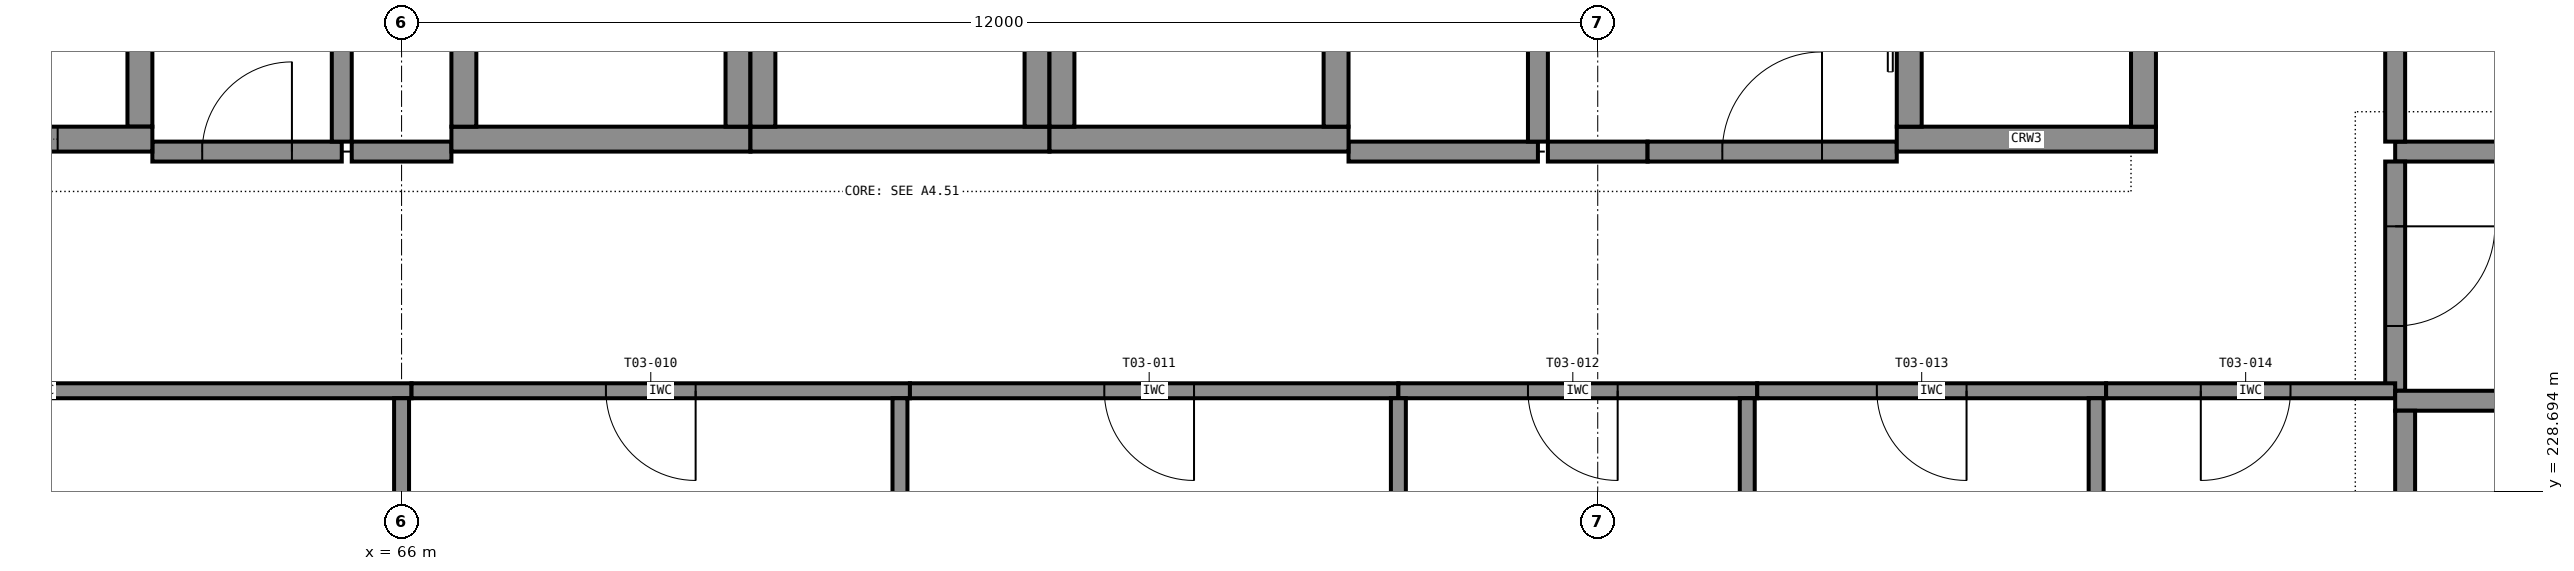
"""IFC4 building model, lengths in metres.
Left out: names, types, materials, properties, quantities, classifications, styles, units other than length and angle.
Written with IfcOpenShell. Run it as: python <this file> out.ifc"""

import sys

from ifc_helpers import new_model, si_unit, direction, frame, frame_2d, origin, place, context, subcontext, project, spatial, rectangle, extrude, element, fill, save


model = new_model("IFC4")
c1 = context("Model", 3, precision=1e-05, world=origin(), true_north=direction((0.0, 1.0)))
c2 = subcontext(c1, "Body", "Model", "MODEL_VIEW")
j1 = project(units=[si_unit("LENGTHUNIT", "METRE"), si_unit("PLANEANGLEUNIT", "RADIAN")], contexts=[c1])
p1 = place(None, origin())
s1 = spatial("IfcSite", under=j1, at=p1, CompositionType="ELEMENT")
p2 = place(p1, origin())
s2 = spatial("IfcBuilding", under=s1, at=p2, CompositionType="ELEMENT")
p3 = place(p2, frame((0.0, 0.0, 17.0)))
s3 = spatial("IfcBuildingStorey", under=s2, at=p3, CompositionType="ELEMENT", Elevation=17.0)
p4 = place(p3, frame((60.5, 232.225, 0.0), z_axis=(0.0, 0.0, 1.0), x_axis=(1.0, 0.0, 0.0)))
e1 = element("IfcWall", 1, at=p4, inside=s3, PredefinedType="SHEAR", context=c2, shape_type="SweptSolid", body=[
    extrude(rectangle(XDim=3.0, YDim=0.25, at=frame_2d((1.5, 0.0))), origin(), (0.0, 0.0, 1.0), 4.0),
])
p5 = place(p4, frame((0.95, 0.0, 0.0)))
e2 = element("IfcOpeningElement", 2, at=p5, cuts=e1, PredefinedType="OPENING", context=c2, shape_type="SweptSolid", body=[
    extrude(rectangle(XDim=1.1, YDim=2.1, at=frame_2d((0.55, 1.05))), frame((0.0, 0.135, 0.0), z_axis=(0.0, -1.0, 0.0), x_axis=(1.0, 0.0, 0.0)), (0.0, 0.0, 1.0), 0.27),
])
p6 = place(p3, frame((63.375, 232.35, 0.0), z_axis=(0.0, 0.0, 1.0), x_axis=(0.0, 1.0, 0.0)))
e3 = element("IfcWall", 3, at=p6, inside=s3, PredefinedType="SHEAR", context=c2, shape_type="SweptSolid", body=[
    extrude(rectangle(XDim=3.3, YDim=0.25, at=frame_2d((1.65, 0.0))), origin(), (0.0, 0.0, 1.0), 4.0),
])
p7 = place(p3, frame((66.5, 232.225, 0.0), z_axis=(0.0, 0.0, 1.0), x_axis=(1.0, 0.0, 0.0)))
e4 = element("IfcWall", 4, at=p7, inside=s3, PredefinedType="SHEAR", context=c2, shape_type="SweptSolid", body=[
    extrude(rectangle(XDim=3.0, YDim=0.25, at=frame_2d((1.5, 0.0))), origin(), (0.0, 0.0, 1.0), 4.0),
])
for number, where, z_axis, x_axis in (
    (5, (66.625, 232.35, 0.0), (0.0, 0.0, 1.0), (0.0, 1.0, 0.0)),
    (6, (69.375, 232.35, 0.0), (0.0, 0.0, 1.0), (0.0, 1.0, 0.0)),
):
    element("IfcWall", number, at=place(p3, frame(where, z_axis=z_axis, x_axis=x_axis)), inside=s3, PredefinedType="SHEAR", context=c2, shape_type="SweptSolid", body=[
        extrude(rectangle(XDim=3.3, YDim=0.25, at=frame_2d((1.65, 0.0))), origin(), (0.0, 0.0, 1.0), 4.0),
    ])
p8 = place(p3, frame((69.5, 232.225, 0.0), z_axis=(0.0, 0.0, 1.0), x_axis=(1.0, 0.0, 0.0)))
e7 = element("IfcWall", 7, at=p8, inside=s3, PredefinedType="SHEAR", context=c2, shape_type="SweptSolid", body=[
    extrude(rectangle(XDim=3.0, YDim=0.25, at=frame_2d((1.5, 0.0))), origin(), (0.0, 0.0, 1.0), 4.0),
])
for number, where, z_axis, x_axis in (
    (8, (69.625, 232.35, 0.0), (0.0, 0.0, 1.0), (0.0, 1.0, 0.0)),
    (9, (72.375, 232.35, 0.0), (0.0, 0.0, 1.0), (0.0, 1.0, 0.0)),
):
    element("IfcWall", number, at=place(p3, frame(where, z_axis=z_axis, x_axis=x_axis)), inside=s3, PredefinedType="SHEAR", context=c2, shape_type="SweptSolid", body=[
        extrude(rectangle(XDim=3.3, YDim=0.25, at=frame_2d((1.65, 0.0))), origin(), (0.0, 0.0, 1.0), 4.0),
    ])
p9 = place(p3, frame((72.5, 232.225, 0.0), z_axis=(0.0, 0.0, 1.0), x_axis=(1.0, 0.0, 0.0)))
e10 = element("IfcWall", 10, at=p9, inside=s3, PredefinedType="SHEAR", context=c2, shape_type="SweptSolid", body=[
    extrude(rectangle(XDim=3.0, YDim=0.25, at=frame_2d((1.5, 0.0))), origin(), (0.0, 0.0, 1.0), 4.0),
])
for number, where, z_axis, x_axis in (
    (11, (72.625, 232.35, 0.0), (0.0, 0.0, 1.0), (0.0, 1.0, 0.0)),
    (12, (75.375, 232.35, 0.0), (0.0, 0.0, 1.0), (0.0, 1.0, 0.0)),
):
    element("IfcWall", number, at=place(p3, frame(where, z_axis=z_axis, x_axis=x_axis)), inside=s3, PredefinedType="SHEAR", context=c2, shape_type="SweptSolid", body=[
        extrude(rectangle(XDim=3.3, YDim=0.25, at=frame_2d((1.65, 0.0))), origin(), (0.0, 0.0, 1.0), 4.0),
    ])
p10 = place(p3, frame((81.0, 232.225, 0.0), z_axis=(0.0, 0.0, 1.0), x_axis=(1.0, 0.0, 0.0)))
e13 = element("IfcWall", 13, at=p10, inside=s3, PredefinedType="SHEAR", context=c2, shape_type="SweptSolid", body=[
    extrude(rectangle(XDim=2.6, YDim=0.25, at=frame_2d((1.3, 0.0))), origin(), (0.0, 0.0, 1.0), 4.0),
])
p11 = place(p3, frame((81.125, 232.35, 0.0), z_axis=(0.0, 0.0, 1.0), x_axis=(0.0, 1.0, 0.0)))
e14 = element("IfcWall", 14, at=p11, inside=s3, PredefinedType="SHEAR", context=c2, shape_type="SweptSolid", body=[
    extrude(rectangle(XDim=3.3, YDim=0.25, at=frame_2d((1.65, 0.0))), origin(), (0.0, 0.0, 1.0), 4.0),
])
p12 = place(p11, frame((1.1, 0.0, 0.0)))
e15 = element("IfcOpeningElement", 15, at=p12, cuts=e14, PredefinedType="OPENING", context=c2, shape_type="SweptSolid", body=[
    extrude(rectangle(XDim=1.1, YDim=2.1, at=frame_2d((0.55, 1.05))), frame((0.0, 0.135, 0.0), z_axis=(0.0, -1.0, 0.0), x_axis=(1.0, 0.0, 0.0)), (0.0, 0.0, 1.0), 0.27),
])
p13 = place(p3, frame((83.475, 232.35, 0.0), z_axis=(0.0, 0.0, 1.0), x_axis=(0.0, 1.0, 0.0)))
e16 = element("IfcWall", 16, at=p13, inside=s3, PredefinedType="SHEAR", context=c2, shape_type="SweptSolid", body=[
    extrude(rectangle(XDim=3.3, YDim=0.25, at=frame_2d((1.65, 0.0))), origin(), (0.0, 0.0, 1.0), 4.0),
])
p14 = place(p3, frame((89.5, 229.6, 0.0), z_axis=(0.0, 0.0, 1.0), x_axis=(-1.0, 0.0, 0.0)))
e17 = element("IfcWall", 17, at=p14, inside=s3, PredefinedType="SHEAR", context=c2, shape_type="SweptSolid", body=[
    extrude(rectangle(XDim=3.5, YDim=0.2, at=frame_2d((1.75, 0.0))), origin(), (0.0, 0.0, 1.0), 4.0),
])
p15 = place(p14, frame((1.15, 0.0, 0.0)))
e18 = element("IfcOpeningElement", 18, at=p15, cuts=e17, PredefinedType="OPENING", context=c2, shape_type="SweptSolid", body=[
    extrude(rectangle(XDim=1.2, YDim=2.1, at=frame_2d((0.6, 1.05))), frame((0.0, 0.11, 0.0), z_axis=(0.0, -1.0, 0.0), x_axis=(1.0, 0.0, 0.0)), (0.0, 0.0, 1.0), 0.22),
])
p16 = place(p3, frame((86.1, 222.0, 0.0), z_axis=(0.0, 0.0, 1.0), x_axis=(0.0, 1.0, 0.0)))
e19 = element("IfcWall", 19, at=p16, inside=s3, PredefinedType="SHEAR", context=c2, shape_type="SweptSolid", body=[
    extrude(rectangle(XDim=7.5, YDim=0.2, at=frame_2d((3.75, 0.0))), origin(), (0.0, 0.0, 1.0), 4.0),
])
p17 = place(p3, frame((63.5, 232.1, 0.0), z_axis=(0.0, 0.0, 1.0), x_axis=(1.0, 0.0, 0.0)))
e20 = element("IfcWall", 20, at=p17, inside=s3, PredefinedType="PARTITIONING", context=c2, shape_type="SweptSolid", body=[
    extrude(rectangle(XDim=1.9, YDim=0.2, at=frame_2d((0.95, 0.0))), origin(), (0.0, 0.0, 1.0), 3.8),
])
p18 = place(p17, frame((0.5, 0.0, 0.0)))
e21 = element("IfcOpeningElement", 21, at=p18, cuts=e20, PredefinedType="OPENING", context=c2, shape_type="SweptSolid", body=[
    extrude(rectangle(XDim=0.9, YDim=2.1, at=frame_2d((0.45, 1.05))), frame((0.0, 0.11, 0.0), z_axis=(0.0, -1.0, 0.0), x_axis=(1.0, 0.0, 0.0)), (0.0, 0.0, 1.0), 0.22),
])
p19 = place(p3, frame((65.5, 232.1, 0.0), z_axis=(0.0, 0.0, 1.0), x_axis=(1.0, 0.0, 0.0)))
e22 = element("IfcWall", 22, at=p19, inside=s3, PredefinedType="PARTITIONING", context=c2, shape_type="SweptSolid", body=[
    extrude(rectangle(XDim=1.0, YDim=0.2, at=frame_2d((0.5, 0.0))), origin(), (0.0, 0.0, 1.0), 3.8),
])
p20 = place(p3, frame((75.5, 232.1, 0.0), z_axis=(0.0, 0.0, 1.0), x_axis=(1.0, 0.0, 0.0)))
e23 = element("IfcWall", 23, at=p20, inside=s3, PredefinedType="PARTITIONING", context=c2, shape_type="SweptSolid", body=[
    extrude(rectangle(XDim=1.9, YDim=0.2, at=frame_2d((0.95, 0.0))), origin(), (0.0, 0.0, 1.0), 3.8),
])
p21 = place(p3, frame((77.5, 232.1, 0.0), z_axis=(0.0, 0.0, 1.0), x_axis=(1.0, 0.0, 0.0)))
e24 = element("IfcWall", 24, at=p21, inside=s3, PredefinedType="PARTITIONING", context=c2, shape_type="SweptSolid", body=[
    extrude(rectangle(XDim=1.0, YDim=0.2, at=frame_2d((0.5, 0.0))), origin(), (0.0, 0.0, 1.0), 3.8),
])
p22 = place(p3, frame((78.5, 232.1, 0.0), z_axis=(0.0, 0.0, 1.0), x_axis=(1.0, 0.0, 0.0)))
e25 = element("IfcWall", 25, at=p22, inside=s3, PredefinedType="PARTITIONING", context=c2, shape_type="SweptSolid", body=[
    extrude(rectangle(XDim=2.5, YDim=0.2, at=frame_2d((1.25, 0.0))), origin(), (0.0, 0.0, 1.0), 3.8),
])
p23 = place(p22, frame((0.75, 0.0, 0.0)))
e26 = element("IfcOpeningElement", 26, at=p23, cuts=e25, PredefinedType="OPENING", context=c2, shape_type="SweptSolid", body=[
    extrude(rectangle(XDim=1.0, YDim=2.1, at=frame_2d((0.5, 1.05))), frame((0.0, 0.11, 0.0), z_axis=(0.0, -1.0, 0.0), x_axis=(1.0, 0.0, 0.0)), (0.0, 0.0, 1.0), 0.22),
])
p24 = place(p3, frame((86.0, 232.1, 0.0), z_axis=(0.0, 0.0, 1.0), x_axis=(1.0, 0.0, 0.0)))
e27 = element("IfcWall", 27, at=p24, inside=s3, PredefinedType="PARTITIONING", context=c2, shape_type="SweptSolid", body=[
    extrude(rectangle(XDim=3.65, YDim=0.2, at=frame_2d((1.825, 0.0))), origin(), (0.0, 0.0, 1.0), 3.8),
])
for number, where, z_axis, x_axis in (
    (28, (65.4, 232.2, 0.0), (0.0, 0.0, 1.0), (0.0, 1.0, 0.0)),
    (29, (77.4, 232.2, 0.0), (0.0, 0.0, 1.0), (0.0, 1.0, 0.0)),
):
    element("IfcWall", number, at=place(p3, frame(where, z_axis=z_axis, x_axis=x_axis)), inside=s3, PredefinedType="PARTITIONING", context=c2, shape_type="SweptSolid", body=[
        extrude(rectangle(XDim=3.6, YDim=0.2, at=frame_2d((1.8, 0.0))), origin(), (0.0, 0.0, 1.0), 3.8),
    ])
p25 = place(p3, frame((86.0, 235.8, 0.0), z_axis=(0.0, 0.0, 1.0), x_axis=(0.0, -1.0, 0.0)))
e30 = element("IfcWall", 30, at=p25, inside=s3, PredefinedType="PARTITIONING", context=c2, shape_type="SweptSolid", body=[
    extrude(rectangle(XDim=3.6, YDim=0.2, at=frame_2d((1.8, 0.0))), origin(), (0.0, 0.0, 1.0), 3.8),
])
p26 = place(p25, frame((1.35, 0.0, 0.0)))
e31 = element("IfcOpeningElement", 31, at=p26, cuts=e30, PredefinedType="OPENING", context=c2, shape_type="SweptSolid", body=[
    extrude(rectangle(XDim=0.9, YDim=2.1, at=frame_2d((0.45, 1.05))), frame((0.0, 0.11, 0.0), z_axis=(0.0, -1.0, 0.0), x_axis=(1.0, 0.0, 0.0)), (0.0, 0.0, 1.0), 0.22),
])
p27 = place(p3, frame((86.0, 232.0, 0.0), z_axis=(0.0, 0.0, 1.0), x_axis=(0.0, -1.0, 0.0)))
e32 = element("IfcWall", 32, at=p27, inside=s3, PredefinedType="PARTITIONING", context=c2, shape_type="SweptSolid", body=[
    extrude(rectangle(XDim=2.3, YDim=0.2, at=frame_2d((1.15, 0.0))), origin(), (0.0, 0.0, 1.0), 3.8),
])
p28 = place(p27, frame((0.65, 0.0, 0.0)))
e33 = element("IfcOpeningElement", 33, at=p28, cuts=e32, PredefinedType="OPENING", context=c2, shape_type="SweptSolid", body=[
    extrude(rectangle(XDim=1.0, YDim=2.1, at=frame_2d((0.5, 1.05))), frame((0.0, 0.11, 0.0), z_axis=(0.0, -1.0, 0.0), x_axis=(1.0, 0.0, 0.0)), (0.0, 0.0, 1.0), 0.22),
])
p29 = place(p3, frame((66.1, 229.7, 0.0), z_axis=(0.0, 0.0, 1.0), x_axis=(-1.0, 0.0, 0.0)))
e34 = element("IfcWall", 34, at=p29, inside=s3, PredefinedType="PARTITIONING", context=c2, shape_type="SweptSolid", body=[
    extrude(rectangle(XDim=23.7, YDim=0.15, at=frame_2d((11.85, 0.0))), origin(), (0.0, 0.0, 1.0), 3.8),
])
p30 = place(p29, frame((15.6, 0.0, 0.0)))
e35 = element("IfcOpeningElement", 35, at=p30, cuts=e34, PredefinedType="OPENING", context=c2, shape_type="SweptSolid", body=[
    extrude(rectangle(XDim=1.0, YDim=2.1, at=frame_2d((0.5, 1.05))), frame((0.0, 0.085, 0.0), z_axis=(0.0, -1.0, 0.0), x_axis=(1.0, 0.0, 0.0)), (0.0, 0.0, 1.0), 0.17),
])
p31 = place(p29, frame((6.6, 0.0, 0.0)))
e36 = element("IfcOpeningElement", 36, at=p31, cuts=e34, PredefinedType="OPENING", context=c2, shape_type="SweptSolid", body=[
    extrude(rectangle(XDim=1.0, YDim=2.1, at=frame_2d((0.5, 1.05))), frame((0.0, 0.085, 0.0), z_axis=(0.0, -1.0, 0.0), x_axis=(1.0, 0.0, 0.0)), (0.0, 0.0, 1.0), 0.17),
])
p32 = place(p3, frame((71.1, 229.7, 0.0), z_axis=(0.0, 0.0, 1.0), x_axis=(-1.0, 0.0, 0.0)))
e37 = element("IfcWall", 37, at=p32, inside=s3, PredefinedType="PARTITIONING", context=c2, shape_type="SweptSolid", body=[
    extrude(rectangle(XDim=5.0, YDim=0.15, at=frame_2d((2.5, 0.0))), origin(), (0.0, 0.0, 1.0), 3.8),
])
p33 = place(p32, frame((2.15, 0.0, 0.0)))
e38 = element("IfcOpeningElement", 38, at=p33, cuts=e37, PredefinedType="OPENING", context=c2, shape_type="SweptSolid", body=[
    extrude(rectangle(XDim=0.9, YDim=2.1, at=frame_2d((0.45, 1.05))), frame((0.0, 0.085, 0.0), z_axis=(0.0, -1.0, 0.0), x_axis=(1.0, 0.0, 0.0)), (0.0, 0.0, 1.0), 0.17),
])
p34 = place(p3, frame((66.0, 222.5, 0.0), z_axis=(0.0, 0.0, 1.0), x_axis=(0.0, 1.0, 0.0)))
e39 = element("IfcWall", 39, at=p34, inside=s3, PredefinedType="PARTITIONING", context=c2, shape_type="SweptSolid", body=[
    extrude(rectangle(XDim=7.125, YDim=0.15, at=frame_2d((3.562, 0.0))), origin(), (0.0, 0.0, 1.0), 3.0),
])
p35 = place(p3, frame((76.0, 229.7, 0.0), z_axis=(0.0, 0.0, 1.0), x_axis=(-1.0, 0.0, 0.0)))
e40 = element("IfcWall", 40, at=p35, inside=s3, PredefinedType="PARTITIONING", context=c2, shape_type="SweptSolid", body=[
    extrude(rectangle(XDim=4.9, YDim=0.15, at=frame_2d((2.45, 0.0))), origin(), (0.0, 0.0, 1.0), 3.8),
])
p36 = place(p35, frame((2.05, 0.0, 0.0)))
e41 = element("IfcOpeningElement", 41, at=p36, cuts=e40, PredefinedType="OPENING", context=c2, shape_type="SweptSolid", body=[
    extrude(rectangle(XDim=0.9, YDim=2.1, at=frame_2d((0.45, 1.05))), frame((0.0, 0.085, 0.0), z_axis=(0.0, -1.0, 0.0), x_axis=(1.0, 0.0, 0.0)), (0.0, 0.0, 1.0), 0.17),
])
p37 = place(p3, frame((71.0, 222.4, 0.0), z_axis=(0.0, 0.0, 1.0), x_axis=(0.0, 1.0, 0.0)))
e42 = element("IfcWall", 42, at=p37, inside=s3, PredefinedType="PARTITIONING", context=c2, shape_type="SweptSolid", body=[
    extrude(rectangle(XDim=7.225, YDim=0.15, at=frame_2d((3.613, 0.0))), origin(), (0.0, 0.0, 1.0), 3.8),
])
p38 = place(p3, frame((79.6, 229.7, 0.0), z_axis=(0.0, 0.0, 1.0), x_axis=(-1.0, 0.0, 0.0)))
e43 = element("IfcWall", 43, at=p38, inside=s3, PredefinedType="PARTITIONING", context=c2, shape_type="SweptSolid", body=[
    extrude(rectangle(XDim=3.6, YDim=0.15, at=frame_2d((1.8, 0.0))), origin(), (0.0, 0.0, 1.0), 3.8),
])
p39 = place(p38, frame((1.4, 0.0, 0.0)))
e44 = element("IfcOpeningElement", 44, at=p39, cuts=e43, PredefinedType="OPENING", context=c2, shape_type="SweptSolid", body=[
    extrude(rectangle(XDim=0.9, YDim=2.1, at=frame_2d((0.45, 1.05))), frame((0.0, 0.085, 0.0), z_axis=(0.0, -1.0, 0.0), x_axis=(1.0, 0.0, 0.0)), (0.0, 0.0, 1.0), 0.17),
])
p40 = place(p3, frame((76.0, 222.4, 0.0), z_axis=(0.0, 0.0, 1.0), x_axis=(0.0, 1.0, 0.0)))
e45 = element("IfcWall", 45, at=p40, inside=s3, PredefinedType="PARTITIONING", context=c2, shape_type="SweptSolid", body=[
    extrude(rectangle(XDim=7.225, YDim=0.15, at=frame_2d((3.613, 0.0))), origin(), (0.0, 0.0, 1.0), 3.8),
])
p41 = place(p3, frame((83.1, 229.7, 0.0), z_axis=(0.0, 0.0, 1.0), x_axis=(-1.0, 0.0, 0.0)))
e46 = element("IfcWall", 46, at=p41, inside=s3, PredefinedType="PARTITIONING", context=c2, shape_type="SweptSolid", body=[
    extrude(rectangle(XDim=3.5, YDim=0.15, at=frame_2d((1.75, 0.0))), origin(), (0.0, 0.0, 1.0), 3.8),
])
p42 = place(p41, frame((1.4, 0.0, 0.0)))
e47 = element("IfcOpeningElement", 47, at=p42, cuts=e46, PredefinedType="OPENING", context=c2, shape_type="SweptSolid", body=[
    extrude(rectangle(XDim=0.9, YDim=2.1, at=frame_2d((0.45, 1.05))), frame((0.0, 0.085, 0.0), z_axis=(0.0, -1.0, 0.0), x_axis=(1.0, 0.0, 0.0)), (0.0, 0.0, 1.0), 0.17),
])
p43 = place(p3, frame((79.5, 222.4, 0.0), z_axis=(0.0, 0.0, 1.0), x_axis=(0.0, 1.0, 0.0)))
e48 = element("IfcWall", 48, at=p43, inside=s3, PredefinedType="PARTITIONING", context=c2, shape_type="SweptSolid", body=[
    extrude(rectangle(XDim=7.225, YDim=0.15, at=frame_2d((3.613, 0.0))), origin(), (0.0, 0.0, 1.0), 3.8),
])
p44 = place(p3, frame((86.0, 229.7, 0.0), z_axis=(0.0, 0.0, 1.0), x_axis=(-1.0, 0.0, 0.0)))
e49 = element("IfcWall", 49, at=p44, inside=s3, PredefinedType="PARTITIONING", context=c2, shape_type="SweptSolid", body=[
    extrude(rectangle(XDim=2.9, YDim=0.15, at=frame_2d((1.45, 0.0))), origin(), (0.0, 0.0, 1.0), 3.8),
])
p45 = place(p44, frame((1.05, 0.0, 0.0)))
e50 = element("IfcOpeningElement", 50, at=p45, cuts=e49, PredefinedType="OPENING", context=c2, shape_type="SweptSolid", body=[
    extrude(rectangle(XDim=0.9, YDim=2.1, at=frame_2d((0.45, 1.05))), frame((0.0, 0.085, 0.0), z_axis=(0.0, -1.0, 0.0), x_axis=(1.0, 0.0, 0.0)), (0.0, 0.0, 1.0), 0.17),
])
p46 = place(p3, frame((83.0, 222.4, 0.0), z_axis=(0.0, 0.0, 1.0), x_axis=(0.0, 1.0, 0.0)))
e51 = element("IfcWall", 51, at=p46, inside=s3, PredefinedType="PARTITIONING", context=c2, shape_type="SweptSolid", body=[
    extrude(rectangle(XDim=7.225, YDim=0.15, at=frame_2d((3.613, 0.0))), origin(), (0.0, 0.0, 1.0), 3.8),
])
p47 = place(p18, origin())
e52 = element("IfcDoor", 52, at=p47, inside=s3, OperationType="SINGLE_SWING_RIGHT", PredefinedType="DOOR", context=c2, shape_type="SweptSolid", body=[
    extrude(rectangle(XDim=0.9, YDim=2.1, at=frame_2d((0.45, 1.05))), frame((0.0, 0.025, 0.0), z_axis=(0.0, -1.0, 0.0), x_axis=(1.0, 0.0, 0.0)), (0.0, 0.0, 1.0), 0.05),
])
fill(e21, e52)
p48 = place(p23, origin())
e53 = element("IfcDoor", 53, at=p48, inside=s3, OperationType="SINGLE_SWING_RIGHT", PredefinedType="DOOR", context=c2, shape_type="SweptSolid", body=[
    extrude(rectangle(XDim=1.0, YDim=2.1, at=frame_2d((0.5, 1.05))), frame((0.0, 0.025, 0.0), z_axis=(0.0, -1.0, 0.0), x_axis=(1.0, 0.0, 0.0)), (0.0, 0.0, 1.0), 0.05),
])
fill(e26, e53)
p49 = place(p28, origin())
e54 = element("IfcDoor", 54, at=p49, inside=s3, OperationType="SINGLE_SWING_LEFT", PredefinedType="DOOR", context=c2, shape_type="SweptSolid", body=[
    extrude(rectangle(XDim=1.0, YDim=2.1, at=frame_2d((0.5, 1.05))), frame((0.0, 0.025, 0.0), z_axis=(0.0, -1.0, 0.0), x_axis=(1.0, 0.0, 0.0)), (0.0, 0.0, 1.0), 0.05),
])
fill(e33, e54)
p50 = place(p33, origin())
e55 = element("IfcDoor", 55, at=p50, inside=s3, OperationType="SINGLE_SWING_LEFT", PredefinedType="DOOR", context=c2, shape_type="SweptSolid", body=[
    extrude(rectangle(XDim=0.9, YDim=2.1, at=frame_2d((0.45, 1.05))), frame((0.0, 0.025, 0.0), z_axis=(0.0, -1.0, 0.0), x_axis=(1.0, 0.0, 0.0)), (0.0, 0.0, 1.0), 0.05),
])
fill(e38, e55)
p51 = place(p36, origin())
e56 = element("IfcDoor", 56, at=p51, inside=s3, OperationType="SINGLE_SWING_LEFT", PredefinedType="DOOR", context=c2, shape_type="SweptSolid", body=[
    extrude(rectangle(XDim=0.9, YDim=2.1, at=frame_2d((0.45, 1.05))), frame((0.0, 0.025, 0.0), z_axis=(0.0, -1.0, 0.0), x_axis=(1.0, 0.0, 0.0)), (0.0, 0.0, 1.0), 0.05),
])
fill(e41, e56)
p52 = place(p39, origin())
e57 = element("IfcDoor", 57, at=p52, inside=s3, OperationType="SINGLE_SWING_LEFT", PredefinedType="DOOR", context=c2, shape_type="SweptSolid", body=[
    extrude(rectangle(XDim=0.9, YDim=2.1, at=frame_2d((0.45, 1.05))), frame((0.0, 0.025, 0.0), z_axis=(0.0, -1.0, 0.0), x_axis=(1.0, 0.0, 0.0)), (0.0, 0.0, 1.0), 0.05),
])
fill(e44, e57)
p53 = place(p42, origin())
e58 = element("IfcDoor", 58, at=p53, inside=s3, OperationType="SINGLE_SWING_LEFT", PredefinedType="DOOR", context=c2, shape_type="SweptSolid", body=[
    extrude(rectangle(XDim=0.9, YDim=2.1, at=frame_2d((0.45, 1.05))), frame((0.0, 0.025, 0.0), z_axis=(0.0, -1.0, 0.0), x_axis=(1.0, 0.0, 0.0)), (0.0, 0.0, 1.0), 0.05),
])
fill(e47, e58)
p54 = place(p45, origin())
e59 = element("IfcDoor", 59, at=p54, inside=s3, OperationType="SINGLE_SWING_RIGHT", PredefinedType="DOOR", context=c2, shape_type="SweptSolid", body=[
    extrude(rectangle(XDim=0.9, YDim=2.1, at=frame_2d((0.45, 1.05))), frame((0.0, 0.025, 0.0), z_axis=(0.0, -1.0, 0.0), x_axis=(1.0, 0.0, 0.0)), (0.0, 0.0, 1.0), 0.05),
])
fill(e50, e59)
p55 = place(p5, origin())
e60 = element("IfcDoor", 60, at=p55, inside=s3, OperationType="SLIDING_TO_LEFT", PredefinedType="DOOR", context=c2, shape_type="SweptSolid", body=[
    extrude(rectangle(XDim=1.1, YDim=2.1, at=frame_2d((0.55, 1.05))), frame((0.0, 0.025, 0.0), z_axis=(0.0, -1.0, 0.0), x_axis=(1.0, 0.0, 0.0)), (0.0, 0.0, 1.0), 0.05),
])
fill(e2, e60)
save(model, sys.argv[1])
